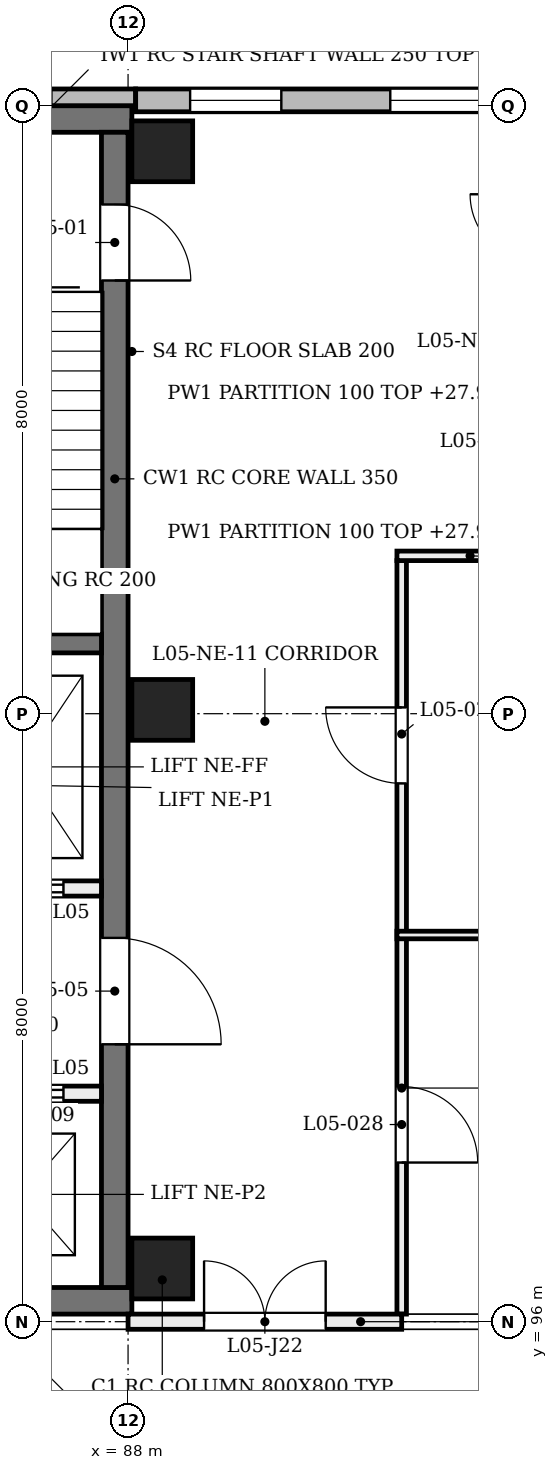
"""IFC4 building model, lengths in metres.
Left out: names, types, materials, properties, quantities, classifications, styles, units other than length and angle.
Written with IfcOpenShell. Run it as: python <this file> out.ifc"""

import sys

from ifc_helpers import new_model, si_unit, direction, frame, frame_2d, origin, origin_2d, place, context, subcontext, project, spatial, rectangle, extrude, element, fill, save


model = new_model("IFC4")
c1 = context("Model", 3, precision=1e-05, world=origin(), true_north=direction((0.0, 1.0)))
c2 = subcontext(c1, "Body", "Model", "MODEL_VIEW")
j1 = project(units=[si_unit("LENGTHUNIT", "METRE"), si_unit("PLANEANGLEUNIT", "RADIAN")], contexts=[c1])
p1 = place(None, origin())
s1 = spatial("IfcSite", under=j1, at=p1, CompositionType="ELEMENT")
p2 = place(p1, origin())
s2 = spatial("IfcBuilding", under=s1, at=p2, CompositionType="ELEMENT")
p3 = place(p2, frame((0.0, 0.0, 24.0)))
s3 = spatial("IfcBuildingStorey", under=s2, at=p3, CompositionType="ELEMENT", Elevation=24.0)
for number, where, z_axis, x_axis in (
    (1, (80.1, 96.275, 0.0), (0.0, 0.0, 1.0), (1.0, 0.0, 0.0)),
    (2, (80.1, 111.825, 0.0), (0.0, 0.0, 1.0), (1.0, 0.0, 0.0)),
):
    element("IfcWall", number, at=place(p3, frame(where, z_axis=z_axis, x_axis=x_axis)), inside=s3, PredefinedType="SHEAR", context=c2, shape_type="SweptSolid", body=[
        extrude(rectangle(XDim=7.95, YDim=0.35, at=frame_2d((3.975, 0.0))), origin(), (0.0, 0.0, 1.0), 4.58),
    ])
p4 = place(p3, frame((87.825, 96.45, 0.0), z_axis=(0.0, 0.0, 1.0), x_axis=(0.0, 1.0, 0.0)))
e3 = element("IfcWall", 3, at=p4, inside=s3, PredefinedType="SHEAR", context=c2, shape_type="SweptSolid", body=[
    extrude(rectangle(XDim=15.2, YDim=0.35, at=frame_2d((7.6, 0.0))), origin(), (0.0, 0.0, 1.0), 4.58),
])
p5 = place(p4, frame((13.25, 0.0, 0.0)))
e4 = element("IfcOpeningElement", 4, at=p5, cuts=e3, PredefinedType="OPENING", context=c2, shape_type="SweptSolid", body=[
    extrude(rectangle(XDim=1.0, YDim=2.1, at=frame_2d((0.5, 1.05))), frame((0.0, 0.185, 0.0), z_axis=(0.0, -1.0, 0.0), x_axis=(1.0, 0.0, 0.0)), (0.0, 0.0, 1.0), 0.37),
])
p6 = place(p4, frame((3.2, 0.0, 0.0)))
e5 = element("IfcOpeningElement", 5, at=p6, cuts=e3, PredefinedType="OPENING", context=c2, shape_type="SweptSolid", body=[
    extrude(rectangle(XDim=1.4, YDim=2.1, at=frame_2d((0.7, 1.05))), frame((0.0, 0.185, 0.0), z_axis=(0.0, -1.0, 0.0), x_axis=(1.0, 0.0, 0.0)), (0.0, 0.0, 1.0), 0.37),
])
for number, where, z_axis, x_axis in (
    (6, (88.45, 96.7, 0.0), (0.0, 0.0, 1.0), (1.0, 0.0, 0.0)),
    (7, (88.45, 104.05, 0.0), (0.0, 0.0, 1.0), (1.0, 0.0, 0.0)),
    (8, (88.45, 111.4, 0.0), (0.0, 0.0, 1.0), (1.0, 0.0, 0.0)),
):
    element("IfcColumn", number, at=place(p3, frame(where, z_axis=z_axis, x_axis=x_axis)), inside=s3, PredefinedType="COLUMN", context=c2, shape_type="SweptSolid", body=[
        extrude(rectangle(XDim=0.8, YDim=0.8, at=origin_2d()), origin(), (0.0, 0.0, 1.0), 4.58),
    ])
p7 = place(p3, frame((79.9, 112.11, 0.0), z_axis=(0.0, 0.0, 1.0), x_axis=(1.0, 0.0, 0.0)))
e9 = element("IfcWall", 9, at=p7, inside=s3, PredefinedType="SOLIDWALL", context=c2, shape_type="SweptSolid", body=[
    extrude(rectangle(XDim=8.2, YDim=0.22, at=frame_2d((4.1, 0.0))), origin(), (0.0, 0.0, 1.0), 3.9),
])
p8 = place(p7, frame((1.308, 0.0, 0.9)))
e10 = element("IfcOpeningElement", 10, at=p8, cuts=e9, PredefinedType="OPENING", context=c2, shape_type="SweptSolid", body=[
    extrude(rectangle(XDim=0.45, YDim=2.6, at=frame_2d((0.225, 1.3))), frame((0.0, 0.12, 0.0), z_axis=(0.0, -1.0, 0.0), x_axis=(1.0, 0.0, 0.0)), (0.0, 0.0, 1.0), 0.24),
])
p9 = place(p7, frame((3.975, 0.0, 0.9)))
e11 = element("IfcOpeningElement", 11, at=p9, cuts=e9, PredefinedType="OPENING", context=c2, shape_type="SweptSolid", body=[
    extrude(rectangle(XDim=0.45, YDim=2.6, at=frame_2d((0.225, 1.3))), frame((0.0, 0.12, 0.0), z_axis=(0.0, -1.0, 0.0), x_axis=(1.0, 0.0, 0.0)), (0.0, 0.0, 1.0), 0.24),
])
p10 = place(p7, frame((6.642, 0.0, 0.9)))
e12 = element("IfcOpeningElement", 12, at=p10, cuts=e9, PredefinedType="OPENING", context=c2, shape_type="SweptSolid", body=[
    extrude(rectangle(XDim=0.45, YDim=2.6, at=frame_2d((0.225, 1.3))), frame((0.0, 0.12, 0.0), z_axis=(0.0, -1.0, 0.0), x_axis=(1.0, 0.0, 0.0)), (0.0, 0.0, 1.0), 0.24),
])
p11 = place(p3, frame((88.1, 112.07, 0.0), z_axis=(0.0, 0.0, 1.0), x_axis=(1.0, 0.0, 0.0)))
e13 = element("IfcWall", 13, at=p11, inside=s3, PredefinedType="SOLIDWALL", context=c2, shape_type="SweptSolid", body=[
    extrude(rectangle(XDim=7.9, YDim=0.3, at=frame_2d((3.95, 0.0))), origin(), (0.0, 0.0, 1.0), 3.9),
])
p12 = place(p11, frame((0.717, 0.0, 1.0)))
e14 = element("IfcOpeningElement", 14, at=p12, cuts=e13, PredefinedType="OPENING", context=c2, shape_type="SweptSolid", body=[
    extrude(rectangle(XDim=1.2, YDim=2.4, at=frame_2d((0.6, 1.2))), frame((0.0, 0.16, 0.0), z_axis=(0.0, -1.0, 0.0), x_axis=(1.0, 0.0, 0.0)), (0.0, 0.0, 1.0), 0.32),
])
p13 = place(p11, frame((3.35, 0.0, 1.0)))
e15 = element("IfcOpeningElement", 15, at=p13, cuts=e13, PredefinedType="OPENING", context=c2, shape_type="SweptSolid", body=[
    extrude(rectangle(XDim=1.2, YDim=2.4, at=frame_2d((0.6, 1.2))), frame((0.0, 0.16, 0.0), z_axis=(0.0, -1.0, 0.0), x_axis=(1.0, 0.0, 0.0)), (0.0, 0.0, 1.0), 0.32),
])
p14 = place(p11, frame((5.983, 0.0, 1.0)))
e16 = element("IfcOpeningElement", 16, at=p14, cuts=e13, PredefinedType="OPENING", context=c2, shape_type="SweptSolid", body=[
    extrude(rectangle(XDim=1.2, YDim=2.4, at=frame_2d((0.6, 1.2))), frame((0.0, 0.16, 0.0), z_axis=(0.0, -1.0, 0.0), x_axis=(1.0, 0.0, 0.0)), (0.0, 0.0, 1.0), 0.32),
])
p15 = place(p3, frame((87.65, 104.925, 0.0), z_axis=(0.0, 0.0, 1.0), x_axis=(-1.0, 0.0, 0.0)))
e17 = element("IfcWall", 17, at=p15, inside=s3, PredefinedType="SOLIDWALL", context=c2, shape_type="SweptSolid", body=[
    extrude(rectangle(XDim=3.1, YDim=0.25, at=frame_2d((1.55, 0.0))), origin(), (0.0, 0.0, 1.0), 4.55),
])
p16 = place(p3, frame((87.65, 101.7, 0.0), z_axis=(0.0, 0.0, 1.0), x_axis=(-1.0, 0.0, 0.0)))
e18 = element("IfcWall", 18, at=p16, inside=s3, PredefinedType="SOLIDWALL", context=c2, shape_type="SweptSolid", body=[
    extrude(rectangle(XDim=7.2, YDim=0.2, at=frame_2d((3.6, 0.0))), origin(), (0.0, 0.0, 1.0), 4.55),
])
p17 = place(p16, frame((0.5, 0.0, 0.0)))
e19 = element("IfcOpeningElement", 19, at=p17, cuts=e18, PredefinedType="OPENING", context=c2, shape_type="SweptSolid", body=[
    extrude(rectangle(XDim=1.1, YDim=2.1, at=frame_2d((0.55, 1.05))), frame((0.0, 0.11, 0.0), z_axis=(0.0, -1.0, 0.0), x_axis=(1.0, 0.0, 0.0)), (0.0, 0.0, 1.0), 0.22),
])
p18 = place(p16, frame((5.6, 0.0, 0.0)))
e20 = element("IfcOpeningElement", 20, at=p18, cuts=e18, PredefinedType="OPENING", context=c2, shape_type="SweptSolid", body=[
    extrude(rectangle(XDim=1.1, YDim=2.1, at=frame_2d((0.55, 1.05))), frame((0.0, 0.11, 0.0), z_axis=(0.0, -1.0, 0.0), x_axis=(1.0, 0.0, 0.0)), (0.0, 0.0, 1.0), 0.22),
])
p19 = place(p16, frame((3.1, 0.0, 0.0)))
e21 = element("IfcOpeningElement", 21, at=p19, cuts=e18, PredefinedType="OPENING", context=c2, shape_type="SweptSolid", body=[
    extrude(rectangle(XDim=1.0, YDim=2.1, at=frame_2d((0.5, 1.05))), frame((0.0, 0.11, 0.0), z_axis=(0.0, -1.0, 0.0), x_axis=(1.0, 0.0, 0.0)), (0.0, 0.0, 1.0), 0.22),
])
p20 = place(p3, frame((87.65, 99.0, 0.0), z_axis=(0.0, 0.0, 1.0), x_axis=(-1.0, 0.0, 0.0)))
e22 = element("IfcWall", 22, at=p20, inside=s3, PredefinedType="SOLIDWALL", context=c2, shape_type="SweptSolid", body=[
    extrude(rectangle(XDim=7.2, YDim=0.2, at=frame_2d((3.6, 0.0))), origin(), (0.0, 0.0, 1.0), 4.55),
])
p21 = place(p20, frame((0.5, 0.0, 0.0)))
e23 = element("IfcOpeningElement", 23, at=p21, cuts=e22, PredefinedType="OPENING", context=c2, shape_type="SweptSolid", body=[
    extrude(rectangle(XDim=1.1, YDim=2.1, at=frame_2d((0.55, 1.05))), frame((0.0, 0.11, 0.0), z_axis=(0.0, -1.0, 0.0), x_axis=(1.0, 0.0, 0.0)), (0.0, 0.0, 1.0), 0.22),
])
p22 = place(p20, frame((5.6, 0.0, 0.0)))
e24 = element("IfcOpeningElement", 24, at=p22, cuts=e22, PredefinedType="OPENING", context=c2, shape_type="SweptSolid", body=[
    extrude(rectangle(XDim=1.1, YDim=2.1, at=frame_2d((0.55, 1.05))), frame((0.0, 0.11, 0.0), z_axis=(0.0, -1.0, 0.0), x_axis=(1.0, 0.0, 0.0)), (0.0, 0.0, 1.0), 0.22),
])
p23 = place(p20, frame((3.1, 0.0, 0.0)))
e25 = element("IfcOpeningElement", 25, at=p23, cuts=e22, PredefinedType="OPENING", context=c2, shape_type="SweptSolid", body=[
    extrude(rectangle(XDim=1.0, YDim=2.1, at=frame_2d((0.5, 1.05))), frame((0.0, 0.11, 0.0), z_axis=(0.0, -1.0, 0.0), x_axis=(1.0, 0.0, 0.0)), (0.0, 0.0, 1.0), 0.22),
])
p24 = place(p3, frame((91.6, 96.1, 0.0), z_axis=(0.0, 0.0, 1.0), x_axis=(0.0, 1.0, 0.0)))
e26 = element("IfcWall", 26, at=p24, inside=s3, PredefinedType="PARTITIONING", context=c2, shape_type="SweptSolid", body=[
    extrude(rectangle(XDim=9.914, YDim=0.125, at=frame_2d((4.957, 0.0))), origin(), (0.0, 0.0, 1.0), 3.88),
])
p25 = place(p24, frame((6.983, 0.0, 0.0)))
e27 = element("IfcOpeningElement", 27, at=p25, cuts=e26, PredefinedType="OPENING", context=c2, shape_type="SweptSolid", body=[
    extrude(rectangle(XDim=1.0, YDim=2.1, at=frame_2d((0.5, 1.05))), frame((0.0, 0.073, 0.0), z_axis=(0.0, -1.0, 0.0), x_axis=(1.0, 0.0, 0.0)), (0.0, 0.0, 1.0), 0.145),
])
p26 = place(p24, frame((1.994, 0.0, 0.0)))
e28 = element("IfcOpeningElement", 28, at=p26, cuts=e26, PredefinedType="OPENING", context=c2, shape_type="SweptSolid", body=[
    extrude(rectangle(XDim=1.0, YDim=2.1, at=frame_2d((0.5, 1.05))), frame((0.0, 0.073, 0.0), z_axis=(0.0, -1.0, 0.0), x_axis=(1.0, 0.0, 0.0)), (0.0, 0.0, 1.0), 0.145),
])
p27 = place(p3, frame((91.538, 101.088, 0.0), z_axis=(0.0, 0.0, 1.0), x_axis=(1.0, 0.0, 0.0)))
e29 = element("IfcWall", 29, at=p27, inside=s3, PredefinedType="PARTITIONING", context=c2, shape_type="SweptSolid", body=[
    extrude(rectangle(XDim=4.382, YDim=0.1, at=frame_2d((2.191, 0.0))), origin(), (0.0, 0.0, 1.0), 3.88),
])
p28 = place(p3, frame((91.538, 106.077, 0.0), z_axis=(0.0, 0.0, 1.0), x_axis=(1.0, 0.0, 0.0)))
e30 = element("IfcWall", 30, at=p28, inside=s3, PredefinedType="PARTITIONING", context=c2, shape_type="SweptSolid", body=[
    extrude(rectangle(XDim=1.925, YDim=0.125, at=frame_2d((0.962, 0.0))), origin(), (0.0, 0.0, 1.0), 4.56),
])
p29 = place(p3, frame((88.0, 96.0, 0.0), z_axis=(0.0, 0.0, 1.0), x_axis=(1.0, 0.0, 0.0)))
e31 = element("IfcWall", 31, at=p29, inside=s3, PredefinedType="PARTITIONING", context=c2, shape_type="SweptSolid", body=[
    extrude(rectangle(XDim=3.6, YDim=0.2, at=frame_2d((1.8, 0.0))), origin(), (0.0, 0.0, 1.0), 3.88),
])
p30 = place(p29, frame((1.0, 0.0, 0.0)))
e32 = element("IfcOpeningElement", 32, at=p30, cuts=e31, PredefinedType="OPENING", context=c2, shape_type="SweptSolid", body=[
    extrude(rectangle(XDim=1.6, YDim=2.1, at=frame_2d((0.8, 1.05))), frame((0.0, 0.11, 0.0), z_axis=(0.0, -1.0, 0.0), x_axis=(1.0, 0.0, 0.0)), (0.0, 0.0, 1.0), 0.22),
])
p31 = place(p12, origin())
e33 = element("IfcWindow", 33, at=p31, inside=s3, PartitioningType="SINGLE_PANEL", PredefinedType="WINDOW", context=c2, shape_type="SweptSolid", body=[
    extrude(rectangle(XDim=1.2, YDim=2.4, at=frame_2d((0.6, 1.2))), frame((0.0, 0.03, 0.0), z_axis=(0.0, -1.0, 0.0), x_axis=(1.0, 0.0, 0.0)), (0.0, 0.0, 1.0), 0.06),
])
fill(e14, e33)
p32 = place(p13, origin())
e34 = element("IfcWindow", 34, at=p32, inside=s3, PartitioningType="SINGLE_PANEL", PredefinedType="WINDOW", context=c2, shape_type="SweptSolid", body=[
    extrude(rectangle(XDim=1.2, YDim=2.4, at=frame_2d((0.6, 1.2))), frame((0.0, 0.03, 0.0), z_axis=(0.0, -1.0, 0.0), x_axis=(1.0, 0.0, 0.0)), (0.0, 0.0, 1.0), 0.06),
])
fill(e15, e34)
p33 = place(p5, frame((1.0, 0.0, 0.0), z_axis=(0.0, 0.0, 1.0), x_axis=(-1.0, 0.0, 0.0)))
e35 = element("IfcDoor", 35, at=p33, inside=s3, OperationType="SINGLE_SWING_LEFT", PredefinedType="DOOR", context=c2, shape_type="SweptSolid", body=[
    extrude(rectangle(XDim=1.0, YDim=2.1, at=frame_2d((0.5, 1.05))), frame((0.0, 0.025, 0.0), z_axis=(0.0, -1.0, 0.0), x_axis=(1.0, 0.0, 0.0)), (0.0, 0.0, 1.0), 0.05),
])
fill(e4, e35)
p34 = place(p17, origin())
e36 = element("IfcDoor", 36, at=p34, inside=s3, OperationType="DOUBLE_DOOR_SLIDING", PredefinedType="DOOR", context=c2, shape_type="SweptSolid", body=[
    extrude(rectangle(XDim=1.1, YDim=2.1, at=frame_2d((0.55, 1.05))), frame((0.0, 0.025, 0.0), z_axis=(0.0, -1.0, 0.0), x_axis=(1.0, 0.0, 0.0)), (0.0, 0.0, 1.0), 0.05),
])
fill(e19, e36)
p35 = place(p21, frame((1.1, 0.0, 0.0), z_axis=(0.0, 0.0, 1.0), x_axis=(-1.0, 0.0, 0.0)))
e37 = element("IfcDoor", 37, at=p35, inside=s3, OperationType="DOUBLE_DOOR_SLIDING", PredefinedType="DOOR", context=c2, shape_type="SweptSolid", body=[
    extrude(rectangle(XDim=1.1, YDim=2.1, at=frame_2d((0.55, 1.05))), frame((0.0, 0.025, 0.0), z_axis=(0.0, -1.0, 0.0), x_axis=(1.0, 0.0, 0.0)), (0.0, 0.0, 1.0), 0.05),
])
fill(e23, e37)
p36 = place(p6, frame((1.4, 0.0, 0.0), z_axis=(0.0, 0.0, 1.0), x_axis=(-1.0, 0.0, 0.0)))
e38 = element("IfcDoor", 38, at=p36, inside=s3, OperationType="SINGLE_SWING_LEFT", PredefinedType="DOOR", context=c2, shape_type="SweptSolid", body=[
    extrude(rectangle(XDim=1.4, YDim=2.1, at=frame_2d((0.7, 1.05))), frame((0.0, 0.025, 0.0), z_axis=(0.0, -1.0, 0.0), x_axis=(1.0, 0.0, 0.0)), (0.0, 0.0, 1.0), 0.05),
])
fill(e5, e38)
p37 = place(p25, frame((1.0, 0.0, 0.0), z_axis=(0.0, 0.0, 1.0), x_axis=(-1.0, 0.0, 0.0)))
e39 = element("IfcDoor", 39, at=p37, inside=s3, OperationType="SINGLE_SWING_RIGHT", PredefinedType="DOOR", context=c2, shape_type="SweptSolid", body=[
    extrude(rectangle(XDim=1.0, YDim=2.1, at=frame_2d((0.5, 1.05))), frame((0.0, 0.025, 0.0), z_axis=(0.0, -1.0, 0.0), x_axis=(1.0, 0.0, 0.0)), (0.0, 0.0, 1.0), 0.05),
])
fill(e27, e39)
p38 = place(p26, frame((1.0, 0.0, 0.0), z_axis=(0.0, 0.0, 1.0), x_axis=(-1.0, 0.0, 0.0)))
e40 = element("IfcDoor", 40, at=p38, inside=s3, OperationType="SINGLE_SWING_LEFT", PredefinedType="DOOR", context=c2, shape_type="SweptSolid", body=[
    extrude(rectangle(XDim=1.0, YDim=2.1, at=frame_2d((0.5, 1.05))), frame((0.0, 0.025, 0.0), z_axis=(0.0, -1.0, 0.0), x_axis=(1.0, 0.0, 0.0)), (0.0, 0.0, 1.0), 0.05),
])
fill(e28, e40)
p39 = place(p30, origin())
e41 = element("IfcDoor", 41, at=p39, inside=s3, OperationType="DOUBLE_DOOR_SINGLE_SWING", PredefinedType="DOOR", context=c2, shape_type="SweptSolid", body=[
    extrude(rectangle(XDim=1.6, YDim=2.1, at=frame_2d((0.8, 1.05))), frame((0.0, 0.025, 0.0), z_axis=(0.0, -1.0, 0.0), x_axis=(1.0, 0.0, 0.0)), (0.0, 0.0, 1.0), 0.05),
])
fill(e32, e41)
save(model, sys.argv[1])
